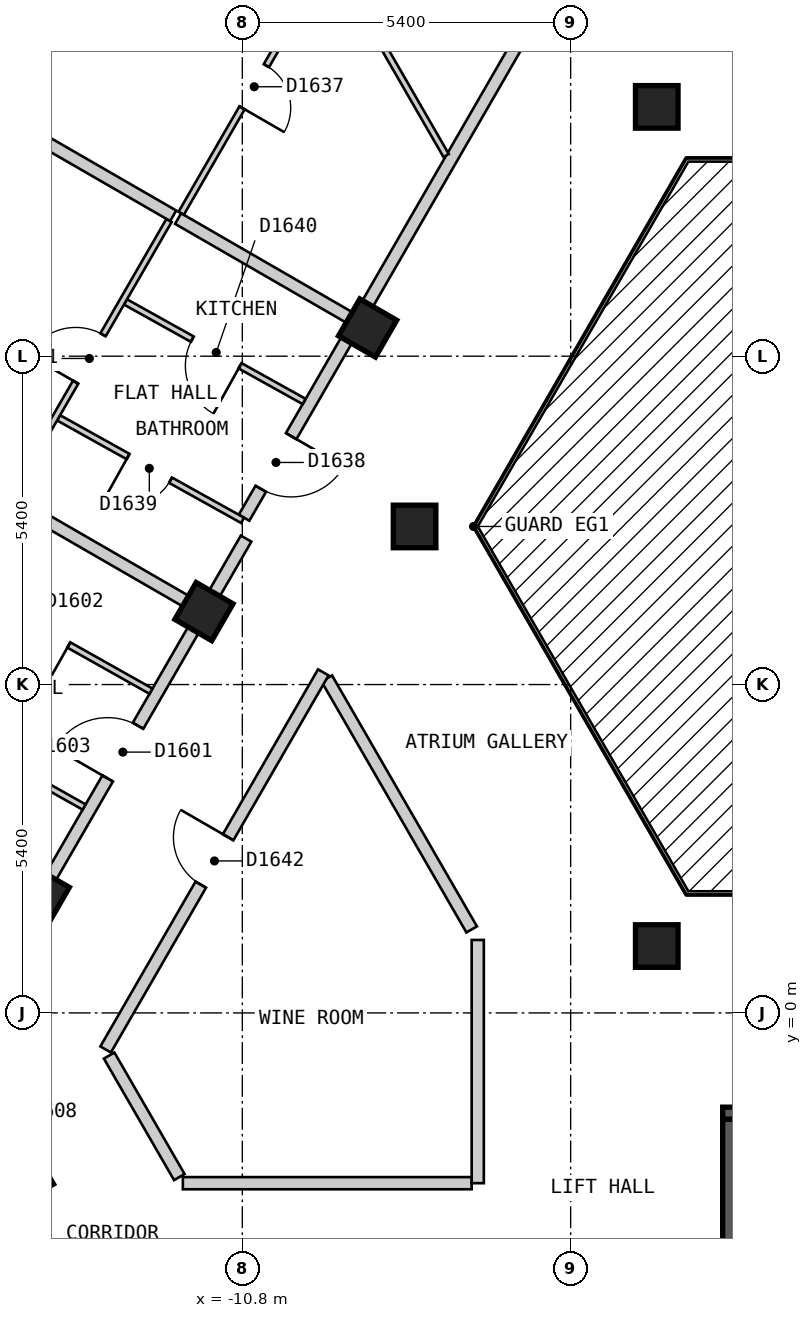
"""IFC4 building model, lengths in metres.
Left out: names, types, materials, properties, quantities, classifications, styles, units other than length and angle.
Written with IfcOpenShell. Run it as: python <this file> out.ifc"""

import sys

from ifc_helpers import new_model, si_unit, direction, frame, frame_2d, origin, origin_2d, place, context, subcontext, project, spatial, rectangle, extrude, element, fill, save


model = new_model("IFC4")
c1 = context("Model", 3, precision=1e-05, world=origin(), true_north=direction((0.0, 1.0)))
c2 = subcontext(c1, "Body", "Model", "MODEL_VIEW")
j1 = project(units=[si_unit("LENGTHUNIT", "METRE"), si_unit("PLANEANGLEUNIT", "RADIAN")], contexts=[c1])
p1 = place(None, origin())
s1 = spatial("IfcSite", under=j1, at=p1, CompositionType="ELEMENT")
p2 = place(p1, origin())
s2 = spatial("IfcBuilding", under=s1, at=p2, CompositionType="ELEMENT")
p3 = place(p2, frame((0.0, 0.0, 163.2)))
s3 = spatial("IfcBuildingStorey", under=s2, at=p3, CompositionType="ELEMENT", Elevation=163.2)
for number, where, z_axis, x_axis in (
    (1, (-14.383, -2.687, 0.0), (0.0, 0.0, 1.0), (0.5, -0.866, 0.0)),
    (2, (-3.984, 14.9, 0.0), (0.0, 0.0, 1.0), (1.0, 0.0, 0.0)),
    (3, (-8.739, 11.263, 0.0), (0.0, 0.0, 1.0), (-0.5, -0.866, 0.0)),
    (4, (-7.967, 8.0, 0.0), (0.0, 0.0, 1.0), (1.0, 0.0, 0.0)),
    (5, (-11.431, 6.6, 0.0), (0.0, 0.0, 1.0), (-0.5, -0.866, 0.0)),
    (6, (-3.984, 1.1, 0.0), (0.0, 0.0, 1.0), (1.0, 0.0, 0.0)),
    (7, (-14.123, 1.937, 0.0), (0.0, 0.0, 1.0), (-0.5, -0.866, 0.0)),
):
    element("IfcColumn", number, at=place(p3, frame(where, z_axis=z_axis, x_axis=x_axis)), inside=s3, PredefinedType="COLUMN", context=c2, shape_type="SweptSolid", body=[
        extrude(rectangle(XDim=0.7, YDim=0.7, at=origin_2d()), origin(), (0.0, 0.0, 1.0), 3.0),
    ])
p4 = place(p3, frame((-2.9, -1.65, 0.0), z_axis=(0.0, 0.0, 1.0), x_axis=(1.0, 0.0, 0.0)))
e8 = element("IfcWall", 8, at=p4, inside=s3, PredefinedType="SOLIDWALL", context=c2, shape_type="SweptSolid", body=[
    extrude(rectangle(XDim=5.8, YDim=0.2, at=frame_2d((2.9, 0.0))), origin(), (0.0, 0.0, 1.0), 2.7),
])
p5 = place(p4, frame((0.3, 0.0, 0.0)))
e9 = element("IfcOpeningElement", 9, at=p5, cuts=e8, PredefinedType="OPENING", context=c2, shape_type="SweptSolid", body=[
    extrude(rectangle(XDim=1.2, YDim=2.1, at=frame_2d((0.6, 1.05))), frame((0.0, 0.11, 0.0), z_axis=(0.0, -1.0, 0.0), x_axis=(1.0, 0.0, 0.0)), (0.0, 0.0, 1.0), 0.22),
])
p6 = place(p3, frame((-2.8, -4.5, 0.0), z_axis=(0.0, 0.0, 1.0), x_axis=(0.0, 1.0, 0.0)))
e10 = element("IfcWall", 10, at=p6, inside=s3, PredefinedType="SOLIDWALL", context=c2, shape_type="SweptSolid", body=[
    extrude(rectangle(XDim=2.75, YDim=0.2, at=frame_2d((1.375, 0.0))), origin(), (0.0, 0.0, 1.0), 2.7),
])
p7 = place(p3, frame((-9.411, 5.5, 0.0), z_axis=(0.0, 0.0, 1.0), x_axis=(0.500018099276, -0.86601495391, 0.0)))
e11 = element("IfcWall", 11, at=p7, inside=s3, PredefinedType="PARTITIONING", context=c2, shape_type="SweptSolid", body=[
    extrude(rectangle(XDim=4.765, YDim=0.2, at=frame_2d((2.383, 0.0))), origin(), (0.0, 0.0, 1.0), 2.7),
])
p8 = place(p3, frame((-12.99, -0.701, 0.0), z_axis=(0.0, 0.0, 1.0), x_axis=(0.499972710878, -0.866041158593, 0.0)))
e12 = element("IfcWall", 12, at=p8, inside=s3, PredefinedType="PARTITIONING", context=c2, shape_type="SweptSolid", body=[
    extrude(rectangle(XDim=2.308, YDim=0.2, at=frame_2d((1.154, 0.0))), origin(), (0.0, 0.0, 1.0), 2.7),
])
p9 = place(p3, frame((-11.778, -2.8, 0.0), z_axis=(0.0, 0.0, 1.0), x_axis=(1.0, 0.0, 0.0)))
e13 = element("IfcWall", 13, at=p9, inside=s3, PredefinedType="PARTITIONING", context=c2, shape_type="SweptSolid", body=[
    extrude(rectangle(XDim=4.75, YDim=0.2, at=frame_2d((2.375, 0.0))), origin(), (0.0, 0.0, 1.0), 2.7),
])
p10 = place(p3, frame((-13.048, -0.601, 0.0), z_axis=(0.0, 0.0, 1.0), x_axis=(0.499982180423, 0.866035691677, 0.0)))
e14 = element("IfcWall", 14, at=p10, inside=s3, PredefinedType="PARTITIONING", context=c2, shape_type="SweptSolid", body=[
    extrude(rectangle(XDim=7.16, YDim=0.2, at=frame_2d((3.58, 0.0))), origin(), (0.0, 0.0, 1.0), 2.7),
])
p11 = place(p10, frame((3.13, 0.0, 0.0)))
e15 = element("IfcOpeningElement", 15, at=p11, cuts=e14, PredefinedType="OPENING", context=c2, shape_type="SweptSolid", body=[
    extrude(rectangle(XDim=0.9, YDim=2.1, at=frame_2d((0.45, 1.05))), frame((0.0, 0.11, 0.0), z_axis=(0.0, -1.0, 0.0), x_axis=(1.0, 0.0, 0.0)), (0.0, 0.0, 1.0), 0.22),
])
p12 = place(p3, frame((-15.53, -0.501, 0.0), z_axis=(0.0, 0.0, 1.0), x_axis=(0.499952498232, 0.866052827206, 0.0)))
e16 = element("IfcWall", 16, at=p12, inside=s3, PredefinedType="PARTITIONING", context=c2, shape_type="SweptSolid", body=[
    extrude(rectangle(XDim=9.585, YDim=0.2, at=frame_2d((4.792, 0.0))), origin(), (0.0, 0.0, 1.0), 2.7),
])
p13 = place(p12, frame((5.031, 0.0, 0.0)))
e17 = element("IfcOpeningElement", 17, at=p13, cuts=e16, PredefinedType="OPENING", context=c2, shape_type="SweptSolid", body=[
    extrude(rectangle(XDim=1.0, YDim=2.1, at=frame_2d((0.5, 1.05))), frame((0.0, 0.11, 0.0), z_axis=(0.0, -1.0, 0.0), x_axis=(1.0, 0.0, 0.0)), (0.0, 0.0, 1.0), 0.22),
])
p14 = place(p3, frame((-10.771, 8.144, 0.0), z_axis=(0.0, 0.0, 1.0), x_axis=(0.500008507724, 0.866020491792, 0.0)))
e18 = element("IfcWall", 18, at=p14, inside=s3, PredefinedType="PARTITIONING", context=c2, shape_type="SweptSolid", body=[
    extrude(rectangle(XDim=10.688, YDim=0.2, at=frame_2d((5.344, 0.0))), origin(), (0.0, 0.0, 1.0), 2.7),
])
p15 = place(p14, frame((9.692, 0.0, 0.0)))
e19 = element("IfcOpeningElement", 19, at=p15, cuts=e18, PredefinedType="OPENING", context=c2, shape_type="SweptSolid", body=[
    extrude(rectangle(XDim=0.8, YDim=2.1, at=frame_2d((0.4, 1.05))), frame((0.0, 0.11, 0.0), z_axis=(0.0, -1.0, 0.0), x_axis=(1.0, 0.0, 0.0)), (0.0, 0.0, 1.0), 0.22),
])
p16 = place(p14, frame((0.549, 0.0, 0.0)))
e20 = element("IfcOpeningElement", 20, at=p16, cuts=e18, PredefinedType="OPENING", context=c2, shape_type="SweptSolid", body=[
    extrude(rectangle(XDim=1.0, YDim=2.1, at=frame_2d((0.5, 1.05))), frame((0.0, 0.11, 0.0), z_axis=(0.0, -1.0, 0.0), x_axis=(1.0, 0.0, 0.0)), (0.0, 0.0, 1.0), 0.22),
])
p17 = place(p3, frame((-6.928, -2.8, 0.0), z_axis=(0.0, 0.0, 1.0), x_axis=(0.0, 1.0, 0.0)))
e21 = element("IfcWall", 21, at=p17, inside=s3, PredefinedType="PARTITIONING", context=c2, shape_type="SweptSolid", body=[
    extrude(rectangle(XDim=4.0, YDim=0.2, at=frame_2d((2.0, 0.0))), origin(), (0.0, 0.0, 1.0), 2.7),
])
p18 = place(p3, frame((-12.721, 11.692, 0.0), z_axis=(0.0, 0.0, 1.0), x_axis=(0.873557394398, -0.486721150859, 0.0)))
e22 = element("IfcWall", 22, at=p18, inside=s3, PredefinedType="PARTITIONING", context=c2, shape_type="SweptSolid", body=[
    extrude(rectangle(XDim=3.363, YDim=0.1, at=frame_2d((1.682, 0.0))), origin(), (0.0, 0.0, 1.0), 2.7),
])
p19 = place(p18, frame((1.257, 0.0, 0.0)))
e23 = element("IfcOpeningElement", 23, at=p19, cuts=e22, PredefinedType="OPENING", context=c2, shape_type="SweptSolid", body=[
    extrude(rectangle(XDim=0.9, YDim=2.1, at=frame_2d((0.45, 1.05))), frame((0.0, 0.06, 0.0), z_axis=(0.0, -1.0, 0.0), x_axis=(1.0, 0.0, 0.0)), (0.0, 0.0, 1.0), 0.12),
])
p20 = place(p3, frame((-13.821, 9.786, 0.0), z_axis=(0.0, 0.0, 1.0), x_axis=(0.873644620966, -0.486564565353, 0.0)))
e24 = element("IfcWall", 24, at=p20, inside=s3, PredefinedType="PARTITIONING", context=c2, shape_type="SweptSolid", body=[
    extrude(rectangle(XDim=3.463, YDim=0.1, at=frame_2d((1.731, 0.0))), origin(), (0.0, 0.0, 1.0), 2.7),
])
p21 = place(p20, frame((1.307, 0.0, 0.0)))
e25 = element("IfcOpeningElement", 25, at=p21, cuts=e24, PredefinedType="OPENING", context=c2, shape_type="SweptSolid", body=[
    extrude(rectangle(XDim=0.8, YDim=2.1, at=frame_2d((0.4, 1.05))), frame((0.0, 0.06, 0.0), z_axis=(0.0, -1.0, 0.0), x_axis=(1.0, 0.0, 0.0)), (0.0, 0.0, 1.0), 0.12),
])
p22 = place(p3, frame((-16.932, 5.372, 0.0), z_axis=(0.0, 0.0, 1.0), x_axis=(0.871514356952, -0.490369988505, 0.0)))
e26 = element("IfcWall", 26, at=p22, inside=s3, PredefinedType="PARTITIONING", context=c2, shape_type="SweptSolid", body=[
    extrude(rectangle(XDim=4.05, YDim=0.1, at=frame_2d((2.025, 0.0))), origin(), (0.0, 0.0, 1.0), 2.7),
])
p23 = place(p22, frame((1.65, 0.0, 0.0)))
e27 = element("IfcOpeningElement", 27, at=p23, cuts=e26, PredefinedType="OPENING", context=c2, shape_type="SweptSolid", body=[
    extrude(rectangle(XDim=0.8, YDim=2.1, at=frame_2d((0.4, 1.05))), frame((0.0, 0.06, 0.0), z_axis=(0.0, -1.0, 0.0), x_axis=(1.0, 0.0, 0.0)), (0.0, 0.0, 1.0), 0.12),
])
p24 = place(p3, frame((-15.832, 7.277, 0.0), z_axis=(0.0, 0.0, 1.0), x_axis=(0.871528850672, -0.490344228523, 0.0)))
e28 = element("IfcWall", 28, at=p24, inside=s3, PredefinedType="PARTITIONING", context=c2, shape_type="SweptSolid", body=[
    extrude(rectangle(XDim=4.05, YDim=0.1, at=frame_2d((2.025, 0.0))), origin(), (0.0, 0.0, 1.0), 2.7),
])
p25 = place(p24, frame((1.6, 0.0, 0.0)))
e29 = element("IfcOpeningElement", 29, at=p25, cuts=e28, PredefinedType="OPENING", context=c2, shape_type="SweptSolid", body=[
    extrude(rectangle(XDim=0.9, YDim=2.1, at=frame_2d((0.45, 1.05))), frame((0.0, 0.06, 0.0), z_axis=(0.0, -1.0, 0.0), x_axis=(1.0, 0.0, 0.0)), (0.0, 0.0, 1.0), 0.12),
])
p26 = place(p3, frame((-11.806, 13.149, 0.0), z_axis=(0.0, 0.0, 1.0), x_axis=(0.499932199895, 0.866064544655, 0.0)))
e30 = element("IfcWall", 30, at=p26, inside=s3, PredefinedType="PARTITIONING", context=c2, shape_type="SweptSolid", body=[
    extrude(rectangle(XDim=8.833, YDim=0.1, at=frame_2d((4.417, 0.0))), origin(), (0.0, 0.0, 1.0), 2.7),
])
p27 = place(p26, frame((6.413, 0.0, 0.0)))
e31 = element("IfcOpeningElement", 31, at=p27, cuts=e30, PredefinedType="OPENING", context=c2, shape_type="SweptSolid", body=[
    extrude(rectangle(XDim=0.9, YDim=2.1, at=frame_2d((0.45, 1.05))), frame((0.0, 0.06, 0.0), z_axis=(0.0, -1.0, 0.0), x_axis=(1.0, 0.0, 0.0)), (0.0, 0.0, 1.0), 0.12),
])
p28 = place(p26, frame((2.004, 0.0, 0.0)))
e32 = element("IfcOpeningElement", 32, at=p28, cuts=e30, PredefinedType="OPENING", context=c2, shape_type="SweptSolid", body=[
    extrude(rectangle(XDim=0.8, YDim=2.1, at=frame_2d((0.4, 1.05))), frame((0.0, 0.06, 0.0), z_axis=(0.0, -1.0, 0.0), x_axis=(1.0, 0.0, 0.0)), (0.0, 0.0, 1.0), 0.12),
])
p29 = place(p3, frame((-14.597, 8.543, 0.0), z_axis=(0.0, 0.0, 1.0), x_axis=(0.499962957901, 0.866046788994, 0.0)))
e33 = element("IfcWall", 33, at=p29, inside=s3, PredefinedType="PARTITIONING", context=c2, shape_type="SweptSolid", body=[
    extrude(rectangle(XDim=5.185, YDim=0.1, at=frame_2d((2.592, 0.0))), origin(), (0.0, 0.0, 1.0), 2.7),
])
p30 = place(p29, frame((2.113, 0.0, 0.0)))
e34 = element("IfcOpeningElement", 34, at=p30, cuts=e33, PredefinedType="OPENING", context=c2, shape_type="SweptSolid", body=[
    extrude(rectangle(XDim=0.9, YDim=2.1, at=frame_2d((0.45, 1.05))), frame((0.0, 0.06, 0.0), z_axis=(0.0, -1.0, 0.0), x_axis=(1.0, 0.0, 0.0)), (0.0, 0.0, 1.0), 0.12),
])
p31 = place(p3, frame((-20.178, 11.65, 0.0), z_axis=(0.0, 0.0, 1.0), x_axis=(0.866016855193, -0.500014806302, 0.0)))
e35 = element("IfcWall", 35, at=p31, inside=s3, PredefinedType="PARTITIONING", context=c2, shape_type="SweptSolid", body=[
    extrude(rectangle(XDim=10.0, YDim=0.2, at=frame_2d((5.0, 0.0))), origin(), (0.0, 0.0, 1.0), 2.7),
])
p32 = place(p3, frame((-17.486, 16.313, 0.0), z_axis=(0.0, 0.0, 1.0), x_axis=(0.866002210665, -0.500040169509, 0.0)))
e36 = element("IfcWall", 36, at=p32, inside=s3, PredefinedType="PARTITIONING", context=c2, shape_type="SweptSolid", body=[
    extrude(rectangle(XDim=6.408, YDim=0.2, at=frame_2d((3.204, 0.0))), origin(), (0.0, 0.0, 1.0), 2.7),
])
p33 = place(p3, frame((-11.856, 13.063, 0.0), z_axis=(0.0, 0.0, 1.0), x_axis=(0.865966208357, -0.500102515474, 0.0)))
e37 = element("IfcWall", 37, at=p33, inside=s3, PredefinedType="PARTITIONING", context=c2, shape_type="SweptSolid", body=[
    extrude(rectangle(XDim=3.299, YDim=0.2, at=frame_2d((1.649, 0.0))), origin(), (0.0, 0.0, 1.0), 2.7),
])
p34 = place(p3, frame((-9.352, 17.4, 0.0), z_axis=(0.0, 0.0, 1.0), x_axis=(0.499785326313, -0.866149310225, 0.0)))
e38 = element("IfcWall", 38, at=p34, inside=s3, PredefinedType="PARTITIONING", context=c2, shape_type="SweptSolid", body=[
    extrude(rectangle(XDim=3.81, YDim=0.1, at=frame_2d((1.905, 0.0))), origin(), (0.0, 0.0, 1.0), 2.7),
])
p35 = place(p13, origin())
e39 = element("IfcDoor", 39, at=p35, inside=s3, OperationType="SINGLE_SWING_LEFT", PredefinedType="DOOR", context=c2, shape_type="SweptSolid", body=[
    extrude(rectangle(XDim=1.0, YDim=2.1, at=frame_2d((0.5, 1.05))), frame((0.0, 0.025, 0.0), z_axis=(0.0, -1.0, 0.0), x_axis=(1.0, 0.0, 0.0)), (0.0, 0.0, 1.0), 0.05),
])
fill(e17, e39)
p36 = place(p25, origin())
e40 = element("IfcDoor", 40, at=p36, inside=s3, OperationType="SINGLE_SWING_RIGHT", PredefinedType="DOOR", context=c2, shape_type="SweptSolid", body=[
    extrude(rectangle(XDim=0.9, YDim=2.1, at=frame_2d((0.45, 1.05))), frame((0.0, 0.025, 0.0), z_axis=(0.0, -1.0, 0.0), x_axis=(1.0, 0.0, 0.0)), (0.0, 0.0, 1.0), 0.05),
])
fill(e29, e40)
p37 = place(p28, origin())
e41 = element("IfcDoor", 41, at=p37, inside=s3, OperationType="SINGLE_SWING_LEFT", PredefinedType="DOOR", context=c2, shape_type="SweptSolid", body=[
    extrude(rectangle(XDim=0.8, YDim=2.1, at=frame_2d((0.4, 1.05))), frame((0.0, 0.025, 0.0), z_axis=(0.0, -1.0, 0.0), x_axis=(1.0, 0.0, 0.0)), (0.0, 0.0, 1.0), 0.05),
])
fill(e32, e41)
p38 = place(p16, origin())
e42 = element("IfcDoor", 42, at=p38, inside=s3, OperationType="SINGLE_SWING_RIGHT", PredefinedType="DOOR", context=c2, shape_type="SweptSolid", body=[
    extrude(rectangle(XDim=1.0, YDim=2.1, at=frame_2d((0.5, 1.05))), frame((0.0, 0.025, 0.0), z_axis=(0.0, -1.0, 0.0), x_axis=(1.0, 0.0, 0.0)), (0.0, 0.0, 1.0), 0.05),
])
fill(e20, e42)
p39 = place(p21, origin())
e43 = element("IfcDoor", 43, at=p39, inside=s3, OperationType="SINGLE_SWING_LEFT", PredefinedType="DOOR", context=c2, shape_type="SweptSolid", body=[
    extrude(rectangle(XDim=0.8, YDim=2.1, at=frame_2d((0.4, 1.05))), frame((0.0, 0.025, 0.0), z_axis=(0.0, -1.0, 0.0), x_axis=(1.0, 0.0, 0.0)), (0.0, 0.0, 1.0), 0.05),
])
fill(e25, e43)
p40 = place(p19, origin())
e44 = element("IfcDoor", 44, at=p40, inside=s3, OperationType="SINGLE_SWING_RIGHT", PredefinedType="DOOR", context=c2, shape_type="SweptSolid", body=[
    extrude(rectangle(XDim=0.9, YDim=2.1, at=frame_2d((0.45, 1.05))), frame((0.0, 0.025, 0.0), z_axis=(0.0, -1.0, 0.0), x_axis=(1.0, 0.0, 0.0)), (0.0, 0.0, 1.0), 0.05),
])
fill(e23, e44)
p41 = place(p30, origin())
e45 = element("IfcDoor", 45, at=p41, inside=s3, OperationType="SINGLE_SWING_LEFT", PredefinedType="DOOR", context=c2, shape_type="SweptSolid", body=[
    extrude(rectangle(XDim=0.9, YDim=2.1, at=frame_2d((0.45, 1.05))), frame((0.0, 0.025, 0.0), z_axis=(0.0, -1.0, 0.0), x_axis=(1.0, 0.0, 0.0)), (0.0, 0.0, 1.0), 0.05),
])
fill(e34, e45)
p42 = place(p11, origin())
e46 = element("IfcDoor", 46, at=p42, inside=s3, OperationType="SINGLE_SWING_RIGHT", PredefinedType="DOOR", context=c2, shape_type="SweptSolid", body=[
    extrude(rectangle(XDim=0.9, YDim=2.1, at=frame_2d((0.45, 1.05))), frame((0.0, 0.025, 0.0), z_axis=(0.0, -1.0, 0.0), x_axis=(1.0, 0.0, 0.0)), (0.0, 0.0, 1.0), 0.05),
])
fill(e15, e46)
save(model, sys.argv[1])
